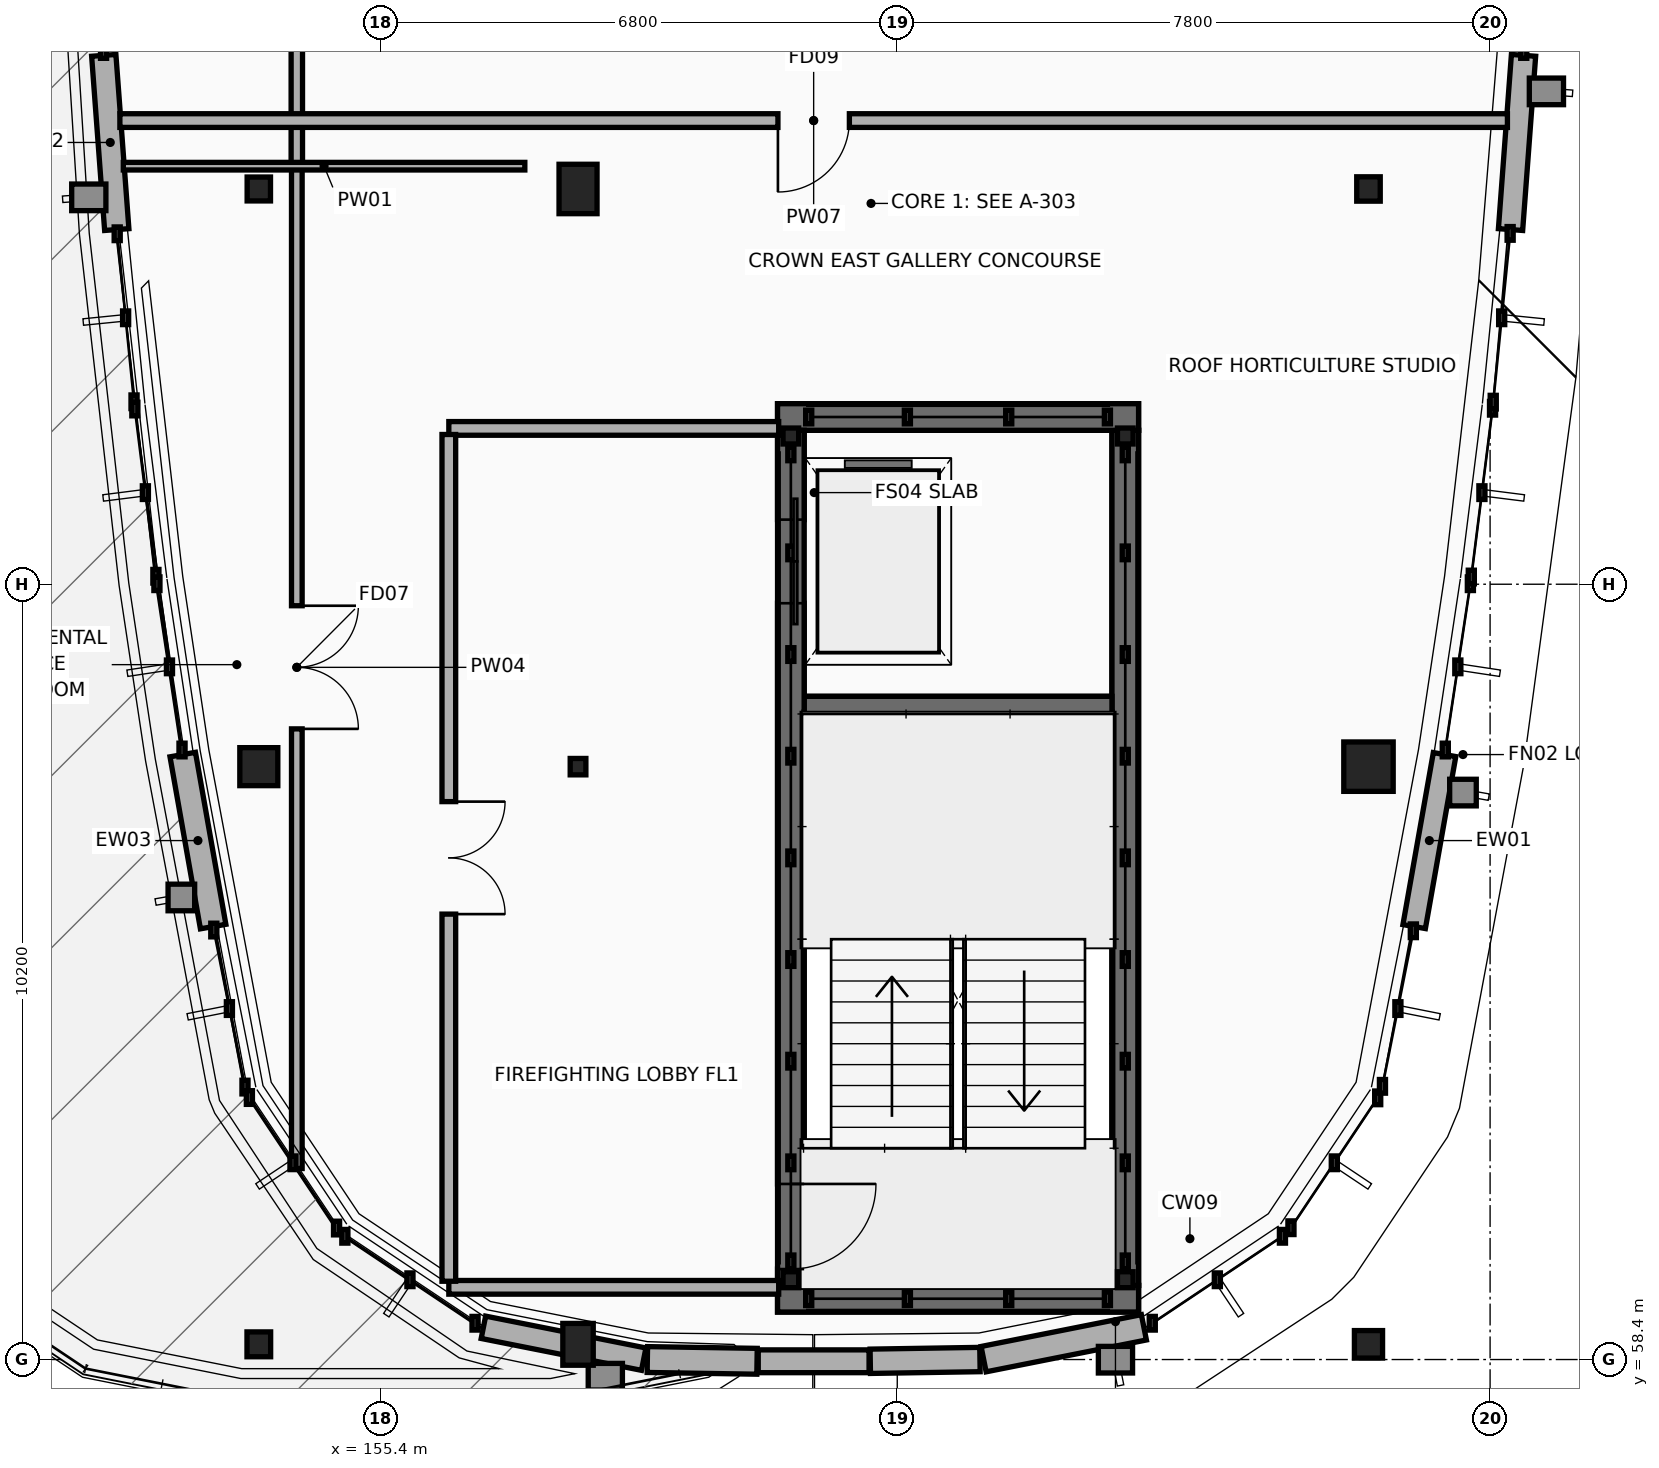
"""IFC4 building model, lengths in metres.
Left out: names, types, materials, properties, quantities, classifications, styles, units other than length and angle.
Written with IfcOpenShell. Run it as: python <this file> out.ifc"""

import sys

from ifc_helpers import new_model, si_unit, direction, frame, frame_2d, origin, origin_2d, place, context, subcontext, project, spatial, rectangle, i_section, extrude, element, fill, save


model = new_model("IFC4")
c1 = context("Model", 3, precision=1e-05, world=origin(), true_north=direction((0.0, 1.0)))
c2 = subcontext(c1, "Body", "Model", "MODEL_VIEW")
j1 = project(units=[si_unit("LENGTHUNIT", "METRE"), si_unit("PLANEANGLEUNIT", "RADIAN")], contexts=[c1])
p1 = place(None, origin())
s1 = spatial("IfcSite", under=j1, at=p1, CompositionType="ELEMENT")
p2 = place(p1, origin())
s2 = spatial("IfcBuilding", under=s1, at=p2, CompositionType="ELEMENT")
p3 = place(p2, frame((0.0, 0.0, 19.8)))
s3 = spatial("IfcBuildingStorey", under=s2, at=p3, CompositionType="ELEMENT", Elevation=19.8)
p4 = place(p3, frame((160.625, 59.2, 0.0), z_axis=(0.0, 0.0, 1.0), x_axis=(1.0, 0.0, 0.0)))
e1 = element("IfcWall", 1, at=p4, inside=s3, PredefinedType="SHEAR", context=c2, shape_type="SweptSolid", body=[
    extrude(rectangle(XDim=4.75, YDim=0.35, at=frame_2d((2.375, 0.0))), origin(), (0.0, 0.0, 1.0), 3.6),
])
p5 = place(p3, frame((165.2, 59.375, 0.0), z_axis=(0.0, 0.0, 1.0), x_axis=(0.0, 1.0, 0.0)))
e2 = element("IfcWall", 2, at=p5, inside=s3, PredefinedType="SHEAR", context=c2, shape_type="SweptSolid", body=[
    extrude(rectangle(XDim=11.25, YDim=0.35, at=frame_2d((5.625, 0.0))), origin(), (0.0, 0.0, 1.0), 3.6),
])
p6 = place(p3, frame((165.375, 70.8, 0.0), z_axis=(0.0, 0.0, 1.0), x_axis=(-1.0, 0.0, 0.0)))
e3 = element("IfcWall", 3, at=p6, inside=s3, PredefinedType="SHEAR", context=c2, shape_type="SweptSolid", body=[
    extrude(rectangle(XDim=4.75, YDim=0.35, at=frame_2d((2.375, 0.0))), origin(), (0.0, 0.0, 1.0), 3.6),
])
p7 = place(p3, frame((160.8, 70.625, 0.0), z_axis=(0.0, 0.0, 1.0), x_axis=(0.0, -1.0, 0.0)))
e4 = element("IfcWall", 4, at=p7, inside=s3, PredefinedType="SHEAR", context=c2, shape_type="SweptSolid", body=[
    extrude(rectangle(XDim=11.25, YDim=0.35, at=frame_2d((5.625, 0.0))), origin(), (0.0, 0.0, 1.0), 3.6),
])
p8 = place(p7, frame((1.175, 0.0, 0.0)))
e5 = element("IfcOpeningElement", 5, at=p8, cuts=e4, PredefinedType="OPENING", context=c2, shape_type="SweptSolid", body=[
    extrude(rectangle(XDim=1.1, YDim=2.2, at=frame_2d((0.55, 1.1))), frame((0.0, 0.185, 0.0), z_axis=(0.0, -1.0, 0.0), x_axis=(1.0, 0.0, 0.0)), (0.0, 0.0, 1.0), 0.37),
])
p9 = place(p7, frame((9.915, 0.0, 0.0)))
e6 = element("IfcOpeningElement", 6, at=p9, cuts=e4, PredefinedType="OPENING", context=c2, shape_type="SweptSolid", body=[
    extrude(rectangle(XDim=1.12, YDim=2.16, at=frame_2d((0.56, 1.08))), frame((0.0, 0.185, 0.0), z_axis=(0.0, -1.0, 0.0), x_axis=(1.0, 0.0, 0.0)), (0.0, 0.0, 1.0), 0.37),
])
p10 = place(p3, frame((160.975, 67.0, 0.0), z_axis=(0.0, 0.0, 1.0), x_axis=(1.0, 0.0, 0.0)))
e7 = element("IfcWall", 7, at=p10, inside=s3, PredefinedType="SHEAR", context=c2, shape_type="SweptSolid", body=[
    extrude(rectangle(XDim=4.05, YDim=0.25, at=frame_2d((2.025, 0.0))), origin(), (0.0, 0.0, 1.0), 3.6),
])
p11 = place(p3, frame((153.8, 58.6, 0.0), z_axis=(0.0, 0.0, 1.0), x_axis=(1.0, 0.0, 0.0)))
e8 = element("IfcColumn", 8, at=p11, inside=s3, PredefinedType="COLUMN", context=c2, shape_type="SweptSolid", body=[
    extrude(i_section(OverallWidth=0.311, OverallDepth=0.327, WebThickness=0.016, FlangeThickness=0.025, at=origin_2d()), origin(), (0.0, 0.0, 1.0), 3.6),
])
p12 = place(p3, frame((153.8, 66.2, 0.0), z_axis=(0.0, 0.0, 1.0), x_axis=(1.0, 0.0, 0.0)))
e9 = element("IfcColumn", 9, at=p12, inside=s3, PredefinedType="COLUMN", context=c2, shape_type="SweptSolid", body=[
    extrude(rectangle(XDim=0.5, YDim=0.5, at=origin_2d()), origin(), (0.0, 0.0, 1.0), 3.6),
])
p13 = place(p3, frame((153.8, 73.8, 0.0), z_axis=(0.0, 0.0, 1.0), x_axis=(1.0, 0.0, 0.0)))
e10 = element("IfcColumn", 10, at=p13, inside=s3, PredefinedType="COLUMN", context=c2, shape_type="SweptSolid", body=[
    extrude(i_section(OverallWidth=0.307, OverallDepth=0.314, WebThickness=0.012, FlangeThickness=0.019, at=origin_2d()), origin(), (0.0, 0.0, 1.0), 3.6),
])
p14 = place(p3, frame((158.0, 58.6, 0.0), z_axis=(0.0, 0.0, 1.0), x_axis=(1.0, 0.0, 0.0)))
e11 = element("IfcColumn", 11, at=p14, inside=s3, PredefinedType="COLUMN", context=c2, shape_type="SweptSolid", body=[
    extrude(rectangle(XDim=0.4, YDim=0.55, at=origin_2d()), origin(), (0.0, 0.0, 1.0), 3.6),
])
p15 = place(p3, frame((158.0, 66.2, 0.0), z_axis=(0.0, 0.0, 1.0), x_axis=(1.0, 0.0, 0.0)))
e12 = element("IfcColumn", 12, at=p15, inside=s3, PredefinedType="COLUMN", context=c2, shape_type="SweptSolid", body=[
    extrude(i_section(OverallWidth=0.206, OverallDepth=0.216, WebThickness=0.01, FlangeThickness=0.017, at=origin_2d()), origin(), (0.0, 0.0, 1.0), 3.6),
])
p16 = place(p3, frame((158.0, 73.8, 0.0), z_axis=(0.0, 0.0, 1.0), x_axis=(1.0, 0.0, 0.0)))
e13 = element("IfcColumn", 13, at=p16, inside=s3, PredefinedType="COLUMN", context=c2, shape_type="SweptSolid", body=[
    extrude(rectangle(XDim=0.5, YDim=0.65, at=origin_2d()), origin(), (0.0, 0.0, 1.0), 3.6),
])
p17 = place(p3, frame((168.4, 58.6, 0.0), z_axis=(0.0, 0.0, 1.0), x_axis=(1.0, 0.0, 0.0)))
e14 = element("IfcColumn", 14, at=p17, inside=s3, PredefinedType="COLUMN", context=c2, shape_type="SweptSolid", body=[
    extrude(i_section(OverallWidth=0.371, OverallDepth=0.362, WebThickness=0.012, FlangeThickness=0.021, at=origin_2d()), origin(), (0.0, 0.0, 1.0), 3.6),
])
p18 = place(p3, frame((168.4, 66.2, 0.0), z_axis=(0.0, 0.0, 1.0), x_axis=(1.0, 0.0, 0.0)))
e15 = element("IfcColumn", 15, at=p18, inside=s3, PredefinedType="COLUMN", context=c2, shape_type="SweptSolid", body=[
    extrude(rectangle(XDim=0.65, YDim=0.65, at=origin_2d()), origin(), (0.0, 0.0, 1.0), 3.6),
])
p19 = place(p3, frame((168.4, 73.8, 0.0), z_axis=(0.0, 0.0, 1.0), x_axis=(1.0, 0.0, 0.0)))
e16 = element("IfcColumn", 16, at=p19, inside=s3, PredefinedType="COLUMN", context=c2, shape_type="SweptSolid", body=[
    extrude(i_section(OverallWidth=0.309, OverallDepth=0.321, WebThickness=0.014, FlangeThickness=0.022, at=origin_2d()), origin(), (0.0, 0.0, 1.0), 3.6),
])
p20 = place(p3, frame((160.625, 59.2, 3.6), z_axis=(0.0, 0.0, 1.0), x_axis=(1.0, 0.0, 0.0)))
e17 = element("IfcWall", 17, at=p20, inside=s3, PredefinedType="SHEAR", context=c2, shape_type="SweptSolid", body=[
    extrude(rectangle(XDim=4.75, YDim=0.35, at=frame_2d((2.375, 0.0))), origin(), (0.0, 0.0, 1.0), 1.4),
])
p21 = place(p3, frame((165.2, 59.375, 3.6), z_axis=(0.0, 0.0, 1.0), x_axis=(0.0, 1.0, 0.0)))
e18 = element("IfcWall", 18, at=p21, inside=s3, PredefinedType="SHEAR", context=c2, shape_type="SweptSolid", body=[
    extrude(rectangle(XDim=11.25, YDim=0.35, at=frame_2d((5.625, 0.0))), origin(), (0.0, 0.0, 1.0), 1.4),
])
p22 = place(p3, frame((165.375, 70.8, 3.6), z_axis=(0.0, 0.0, 1.0), x_axis=(-1.0, 0.0, 0.0)))
e19 = element("IfcWall", 19, at=p22, inside=s3, PredefinedType="SHEAR", context=c2, shape_type="SweptSolid", body=[
    extrude(rectangle(XDim=4.75, YDim=0.35, at=frame_2d((2.375, 0.0))), origin(), (0.0, 0.0, 1.0), 1.4),
])
p23 = place(p3, frame((160.975, 67.0, 3.6), z_axis=(0.0, 0.0, 1.0), x_axis=(1.0, 0.0, 0.0)))
e20 = element("IfcWall", 20, at=p23, inside=s3, PredefinedType="SHEAR", context=c2, shape_type="SweptSolid", body=[
    extrude(rectangle(XDim=4.05, YDim=0.25, at=frame_2d((2.025, 0.0))), origin(), (0.0, 0.0, 1.0), 3.0),
])
p24 = place(p3, frame((160.8, 70.625, 3.6), z_axis=(0.0, 0.0, 1.0), x_axis=(0.0, -1.0, 0.0)))
e21 = element("IfcWall", 21, at=p24, inside=s3, PredefinedType="SHEAR", context=c2, shape_type="SweptSolid", body=[
    extrude(rectangle(XDim=11.25, YDim=0.35, at=frame_2d((5.625, 0.0))), origin(), (0.0, 0.0, 1.0), 1.4),
])
for number, where, z_axis, x_axis in (
    (22, (160.8, 59.45, 5.0), (0.0, 0.0, 1.0), (1.0, 0.0, 0.0)),
    (23, (165.2, 59.45, 5.0), (0.0, 0.0, 1.0), (1.0, 0.0, 0.0)),
    (24, (160.8, 70.55, 5.0), (0.0, 0.0, 1.0), (1.0, 0.0, 0.0)),
    (25, (165.2, 70.55, 5.0), (0.0, 0.0, 1.0), (1.0, 0.0, 0.0)),
):
    element("IfcColumn", number, at=place(p3, frame(where, z_axis=z_axis, x_axis=x_axis)), inside=s3, PredefinedType="COLUMN", context=c2, shape_type="SweptSolid", body=[
        extrude(i_section(OverallWidth=0.206, OverallDepth=0.21, WebThickness=0.01, FlangeThickness=0.014, at=origin_2d()), origin(), (0.0, 0.0, 1.0), 1.608),
    ])
p25 = place(p3, frame((160.355, 58.377, 0.0), z_axis=(0.0, 0.0, 1.0), x_axis=(-0.999873535579, 0.015903233899, 0.0)))
e26 = element("IfcWall", 26, at=p25, inside=s3, PredefinedType="STANDARD", context=c2, shape_type="SweptSolid", body=[
    extrude(rectangle(XDim=1.443, YDim=0.34, at=frame_2d((0.722, 0.0))), origin(), (0.0, 0.0, 1.0), 3.364),
])
p26 = place(p3, frame((161.829, 58.377, 0.0), z_axis=(0.0, 0.0, 1.0), x_axis=(-1.0, 0.0, 0.0)))
e27 = element("IfcWall", 27, at=p26, inside=s3, PredefinedType="STANDARD", context=c2, shape_type="SweptSolid", body=[
    extrude(rectangle(XDim=1.458, YDim=0.3, at=frame_2d((0.729, 0.0))), origin(), (0.0, 0.0, 1.0), 3.364),
])
p27 = place(p3, frame((163.288, 58.4, 0.0), z_axis=(0.0, 0.0, 1.0), x_axis=(-0.999873578357, -0.015900544132, 0.0)))
e28 = element("IfcWall", 28, at=p27, inside=s3, PredefinedType="STANDARD", context=c2, shape_type="SweptSolid", body=[
    extrude(rectangle(XDim=1.443, YDim=0.32, at=frame_2d((0.722, 0.0))), origin(), (0.0, 0.0, 1.0), 3.364),
])
p28 = place(p3, frame((165.445, 58.824, 0.0), z_axis=(0.0, 0.0, 1.0), x_axis=(-0.980837468909, -0.19482776903, 0.0)))
e29 = element("IfcWall", 29, at=p28, inside=s3, PredefinedType="STANDARD", context=c2, shape_type="SweptSolid", body=[
    extrude(rectangle(XDim=2.15, YDim=0.34, at=frame_2d((1.075, 0.0))), origin(), (0.0, 0.0, 1.0), 3.364),
])
p29 = place(p3, frame((169.401, 66.359, 0.0), z_axis=(0.0, 0.0, 1.0), x_axis=(-0.17402169586, -0.984741818636, 0.0)))
e30 = element("IfcWall", 30, at=p29, inside=s3, PredefinedType="STANDARD", context=c2, shape_type="SweptSolid", body=[
    extrude(rectangle(XDim=2.298, YDim=0.3, at=frame_2d((1.149, 0.0))), origin(), (0.0, 0.0, 1.0), 2.943),
])
for number, where, z_axis, x_axis in (
    (31, (170.44, 75.558, 0.0), (0.0, 0.0, 1.0), (-0.074, -0.997, 0.0)),
    (32, (151.931, 73.266, 0.0), (0.0, 0.0, 1.0), (-0.074, 0.997, 0.0)),
):
    element("IfcWall", number, at=place(p3, frame(where, z_axis=z_axis, x_axis=x_axis)), inside=s3, PredefinedType="STANDARD", context=c2, shape_type="SweptSolid", body=[
        extrude(rectangle(XDim=2.298, YDim=0.32, at=frame_2d((1.149, 0.0))), origin(), (0.0, 0.0, 1.0), 2.943),
    ])
p30 = place(p3, frame((153.199, 64.096, 0.0), z_axis=(0.0, 0.0, 1.0), x_axis=(-0.17402169586, 0.984741818636, 0.0)))
e33 = element("IfcWall", 33, at=p30, inside=s3, PredefinedType="STANDARD", context=c2, shape_type="SweptSolid", body=[
    extrude(rectangle(XDim=2.298, YDim=0.34, at=frame_2d((1.149, 0.0))), origin(), (0.0, 0.0, 1.0), 2.943),
])
p31 = place(p3, frame((158.864, 58.405, 0.0), z_axis=(0.0, 0.0, 1.0), x_axis=(-0.980837468909, 0.19482776903, 0.0)))
e34 = element("IfcWall", 34, at=p31, inside=s3, PredefinedType="STANDARD", context=c2, shape_type="SweptSolid", body=[
    extrude(rectangle(XDim=2.15, YDim=0.3, at=frame_2d((1.075, 0.0))), origin(), (0.0, 0.0, 1.0), 2.62),
])
p32 = place(p3, frame((156.3, 59.35, 0.0), z_axis=(0.0, 0.0, 1.0), x_axis=(1.0, 0.0, 0.0)))
e35 = element("IfcWall", 35, at=p32, inside=s3, PredefinedType="PARTITIONING", context=c2, shape_type="SweptSolid", body=[
    extrude(rectangle(XDim=4.34, YDim=0.18, at=frame_2d((2.17, 0.0))), origin(), (0.0, 0.0, 1.0), 2.688),
])
p33 = place(p3, frame((160.64, 70.65, 0.0), z_axis=(0.0, 0.0, 1.0), x_axis=(-1.0, 0.0, 0.0)))
e36 = element("IfcWall", 36, at=p33, inside=s3, PredefinedType="PARTITIONING", context=c2, shape_type="SweptSolid", body=[
    extrude(rectangle(XDim=4.34, YDim=0.18, at=frame_2d((2.17, 0.0))), origin(), (0.0, 0.0, 1.0), 2.616),
])
p34 = place(p3, frame((156.3, 70.57, 0.0), z_axis=(0.0, 0.0, 1.0), x_axis=(0.0, -1.0, 0.0)))
e37 = element("IfcWall", 37, at=p34, inside=s3, PredefinedType="PARTITIONING", context=c2, shape_type="SweptSolid", body=[
    extrude(rectangle(XDim=11.14, YDim=0.18, at=frame_2d((5.57, 0.0))), origin(), (0.0, 0.0, 1.0), 2.692),
])
p35 = place(p34, frame((4.83, 0.0, 0.0)))
e38 = element("IfcOpeningElement", 38, at=p35, cuts=e37, PredefinedType="OPENING", context=c2, shape_type="SweptSolid", body=[
    extrude(rectangle(XDim=1.48, YDim=2.22, at=frame_2d((0.74, 1.11))), frame((0.0, 0.1, 0.0), z_axis=(0.0, -1.0, 0.0), x_axis=(1.0, 0.0, 0.0)), (0.0, 0.0, 1.0), 0.2),
])
p36 = place(p3, frame((154.3, 74.1, 0.0), z_axis=(0.0, 0.0, 1.0), x_axis=(0.0, -1.0, 0.0)))
e39 = element("IfcWall", 39, at=p36, inside=s3, PredefinedType="PARTITIONING", context=c2, shape_type="SweptSolid", body=[
    extrude(rectangle(XDim=13.187, YDim=0.14, at=frame_2d((6.594, 0.0))), origin(), (0.0, 0.0, 1.0), 2.692),
])
p37 = place(p36, frame((5.783, 0.0, 0.0)))
e40 = element("IfcOpeningElement", 40, at=p37, cuts=e39, PredefinedType="OPENING", context=c2, shape_type="SweptSolid", body=[
    extrude(rectangle(XDim=1.62, YDim=2.32, at=frame_2d((0.81, 1.16))), frame((0.0, 0.08, 0.0), z_axis=(0.0, -1.0, 0.0), x_axis=(1.0, 0.0, 0.0)), (0.0, 0.0, 1.0), 0.16),
])
p38 = place(p3, frame((154.3, 88.9, 0.0), z_axis=(0.0, 0.0, 1.0), x_axis=(0.0, -1.0, 0.0)))
e41 = element("IfcWall", 41, at=p38, inside=s3, PredefinedType="PARTITIONING", context=c2, shape_type="SweptSolid", body=[
    extrude(rectangle(XDim=14.8, YDim=0.15, at=frame_2d((7.4, 0.0))), origin(), (0.0, 0.0, 1.0), 2.538),
])
p39 = place(p38, frame((4.51, 0.0, 0.0)))
e42 = element("IfcOpeningElement", 42, at=p39, cuts=e41, PredefinedType="OPENING", context=c2, shape_type="SweptSolid", body=[
    extrude(rectangle(XDim=1.38, YDim=2.2, at=frame_2d((0.69, 1.1))), frame((0.0, 0.085, 0.0), z_axis=(0.0, -1.0, 0.0), x_axis=(1.0, 0.0, 0.0)), (0.0, 0.0, 1.0), 0.17),
])
p40 = place(p3, frame((170.228, 74.7, 0.0), z_axis=(0.0, 0.0, 1.0), x_axis=(-1.0, 0.0, 0.0)))
e43 = element("IfcWall", 43, at=p40, inside=s3, PredefinedType="PARTITIONING", context=c2, shape_type="SweptSolid", body=[
    extrude(rectangle(XDim=18.256, YDim=0.18, at=frame_2d((9.128, 0.0))), origin(), (0.0, 0.0, 1.0), 2.612),
])
p41 = place(p40, frame((8.658, 0.0, 0.0)))
e44 = element("IfcOpeningElement", 44, at=p41, cuts=e43, PredefinedType="OPENING", context=c2, shape_type="SweptSolid", body=[
    extrude(rectangle(XDim=0.94, YDim=2.1, at=frame_2d((0.47, 1.05))), frame((0.0, 0.1, 0.0), z_axis=(0.0, -1.0, 0.0), x_axis=(1.0, 0.0, 0.0)), (0.0, 0.0, 1.0), 0.2),
])
p42 = place(p3, frame((152.017, 74.1, 0.0), z_axis=(0.0, 0.0, 1.0), x_axis=(1.0, 0.0, 0.0)))
e45 = element("IfcWall", 45, at=p42, inside=s3, PredefinedType="PARTITIONING", context=c2, shape_type="SweptSolid", body=[
    extrude(rectangle(XDim=5.283, YDim=0.1, at=frame_2d((2.642, 0.0))), origin(), (0.0, 0.0, 1.0), 2.767),
])
p43 = place(p8, origin())
e46 = element("IfcDoor", 46, at=p43, inside=s3, OperationType="DOUBLE_DOOR_SLIDING", PredefinedType="DOOR", context=c2, shape_type="SweptSolid", body=[
    extrude(rectangle(XDim=1.1, YDim=2.2, at=frame_2d((0.55, 1.1))), frame((0.0, 0.025, 0.0), z_axis=(0.0, -1.0, 0.0), x_axis=(1.0, 0.0, 0.0)), (0.0, 0.0, 1.0), 0.05),
])
fill(e5, e46)
p44 = place(p9, origin())
e47 = element("IfcDoor", 47, at=p44, inside=s3, OperationType="SINGLE_SWING_LEFT", PredefinedType="DOOR", context=c2, shape_type="SweptSolid", body=[
    extrude(rectangle(XDim=1.12, YDim=2.16, at=frame_2d((0.56, 1.08))), frame((0.0, 0.025, 0.0), z_axis=(0.0, -1.0, 0.0), x_axis=(1.0, 0.0, 0.0)), (0.0, 0.0, 1.0), 0.05),
])
fill(e6, e47)
p45 = place(p35, origin())
e48 = element("IfcDoor", 48, at=p45, inside=s3, OperationType="DOUBLE_DOOR_SINGLE_SWING", PredefinedType="DOOR", context=c2, shape_type="SweptSolid", body=[
    extrude(rectangle(XDim=1.48, YDim=2.22, at=frame_2d((0.74, 1.11))), frame((0.0, 0.025, 0.0), z_axis=(0.0, -1.0, 0.0), x_axis=(1.0, 0.0, 0.0)), (0.0, 0.0, 1.0), 0.05),
])
fill(e38, e48)
p46 = place(p37, origin())
e49 = element("IfcDoor", 49, at=p46, inside=s3, OperationType="DOUBLE_DOOR_SINGLE_SWING", PredefinedType="DOOR", context=c2, shape_type="SweptSolid", body=[
    extrude(rectangle(XDim=1.62, YDim=2.32, at=frame_2d((0.81, 1.16))), frame((0.0, 0.025, 0.0), z_axis=(0.0, -1.0, 0.0), x_axis=(1.0, 0.0, 0.0)), (0.0, 0.0, 1.0), 0.05),
])
fill(e40, e49)
p47 = place(p41, origin())
e50 = element("IfcDoor", 50, at=p47, inside=s3, OperationType="SINGLE_SWING_RIGHT", PredefinedType="DOOR", context=c2, shape_type="SweptSolid", body=[
    extrude(rectangle(XDim=0.94, YDim=2.1, at=frame_2d((0.47, 1.05))), frame((0.0, 0.025, 0.0), z_axis=(0.0, -1.0, 0.0), x_axis=(1.0, 0.0, 0.0)), (0.0, 0.0, 1.0), 0.05),
])
fill(e44, e50)
save(model, sys.argv[1])
